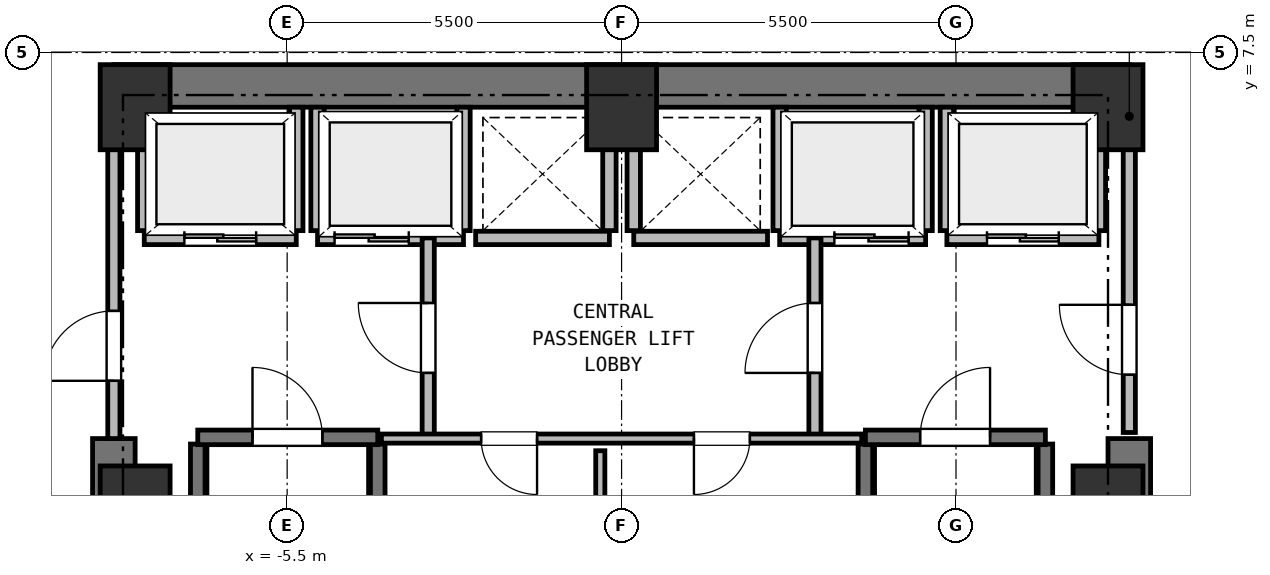
"""IFC4 building model, lengths in metres.
Left out: names, types, materials, properties, quantities, classifications, styles, units other than length and angle.
Written with IfcOpenShell. Run it as: python <this file> out.ifc"""

import sys

from ifc_helpers import new_model, si_unit, direction, frame, frame_2d, origin, origin_2d, place, context, subcontext, project, spatial, rectangle, extrude, element, fill, save


model = new_model("IFC4")
c1 = context("Model", 3, precision=1e-05, world=origin(), true_north=direction((0.0, 1.0)))
c2 = subcontext(c1, "Body", "Model", "MODEL_VIEW")
j1 = project(units=[si_unit("LENGTHUNIT", "METRE"), si_unit("PLANEANGLEUNIT", "RADIAN")], contexts=[c1])
p1 = place(None, origin())
s1 = spatial("IfcSite", under=j1, at=p1, CompositionType="ELEMENT")
p2 = place(p1, origin())
s2 = spatial("IfcBuilding", under=s1, at=p2, CompositionType="ELEMENT")
p3 = place(p2, frame((0.0, 0.0, 21.5)))
s3 = spatial("IfcBuildingStorey", under=s2, at=p3, CompositionType="ELEMENT", Elevation=21.5)
for number, where, z_axis, x_axis in (
    (1, (8.0, 0.0, 0.0), (0.0, 0.0, 1.0), (1.0, 0.0, 0.0)),
    (2, (8.0, 6.6, 0.0), (0.0, 0.0, 1.0), (1.0, 0.0, 0.0)),
    (3, (0.0, 6.6, 0.0), (0.0, 0.0, 1.0), (1.0, 0.0, 0.0)),
    (4, (-8.0, 6.6, 0.0), (0.0, 0.0, 1.0), (1.0, 0.0, 0.0)),
    (5, (-8.0, 0.0, 0.0), (0.0, 0.0, 1.0), (1.0, 0.0, 0.0)),
):
    element("IfcColumn", number, at=place(p3, frame(where, z_axis=z_axis, x_axis=x_axis)), inside=s3, PredefinedType="COLUMN", context=c2, shape_type="SweptSolid", body=[
        extrude(rectangle(XDim=1.15, YDim=1.4, at=origin_2d()), origin(), (0.0, 0.0, 1.0), 4.5),
    ])
p4 = place(p3, frame((-8.35, 6.95, 0.0), z_axis=(0.0, 0.0, 1.0), x_axis=(1.0, 0.0, 0.0)))
e6 = element("IfcWall", 6, at=p4, inside=s3, PredefinedType="SHEAR", context=c2, shape_type="SweptSolid", body=[
    extrude(rectangle(XDim=16.7, YDim=0.7, at=frame_2d((8.35, 0.0))), origin(), (0.0, 0.0, 1.0), 4.22),
])
for number, where, z_axis, x_axis in (
    (7, (-8.35, -6.95, 0.0), (0.0, 0.0, 1.0), (0.0, 1.0, 0.0)),
    (8, (8.35, -6.95, 0.0), (0.0, 0.0, 1.0), (0.0, 1.0, 0.0)),
):
    element("IfcWall", number, at=place(p3, frame(where, z_axis=z_axis, x_axis=x_axis)), inside=s3, PredefinedType="SHEAR", context=c2, shape_type="SweptSolid", body=[
        extrude(rectangle(XDim=8.1, YDim=0.7, at=frame_2d((4.05, 0.0))), origin(), (0.0, 0.0, 1.0), 4.22),
    ])
for number, where, z_axis, x_axis in (
    (9, (-6.97, -6.16, 0.0), (0.0, 0.0, 1.0), (0.0, 1.0, 0.0)),
    (10, (-4.01, -6.16, 0.0), (0.0, 0.0, 1.0), (0.0, 1.0, 0.0)),
):
    element("IfcWall", number, at=place(p3, frame(where, z_axis=z_axis, x_axis=x_axis)), inside=s3, PredefinedType="SHEAR", context=c2, shape_type="SweptSolid", body=[
        extrude(rectangle(XDim=7.22, YDim=0.24, at=frame_2d((3.61, 0.0))), origin(), (0.0, 0.0, 1.0), 4.22),
    ])
p5 = place(p3, frame((-6.97, 1.17, 0.0), z_axis=(0.0, 0.0, 1.0), x_axis=(1.0, 0.0, 0.0)))
e11 = element("IfcWall", 11, at=p5, inside=s3, PredefinedType="SHEAR", context=c2, shape_type="SweptSolid", body=[
    extrude(rectangle(XDim=2.96, YDim=0.24, at=frame_2d((1.48, 0.0))), origin(), (0.0, 0.0, 1.0), 4.22),
])
p6 = place(p5, frame((0.9, 0.0, 0.0)))
e12 = element("IfcOpeningElement", 12, at=p6, cuts=e11, PredefinedType="OPENING", context=c2, shape_type="SweptSolid", body=[
    extrude(rectangle(XDim=1.15, YDim=2.15, at=frame_2d((0.575, 1.075))), frame((0.0, 0.13, 0.0), z_axis=(0.0, -1.0, 0.0), x_axis=(1.0, 0.0, 0.0)), (0.0, 0.0, 1.0), 0.26),
])
for number, where, z_axis, x_axis in (
    (13, (4.01, -6.16, 0.0), (0.0, 0.0, 1.0), (0.0, 1.0, 0.0)),
    (14, (6.97, -6.16, 0.0), (0.0, 0.0, 1.0), (0.0, 1.0, 0.0)),
):
    element("IfcWall", number, at=place(p3, frame(where, z_axis=z_axis, x_axis=x_axis)), inside=s3, PredefinedType="SHEAR", context=c2, shape_type="SweptSolid", body=[
        extrude(rectangle(XDim=7.22, YDim=0.24, at=frame_2d((3.61, 0.0))), origin(), (0.0, 0.0, 1.0), 4.22),
    ])
p7 = place(p3, frame((4.01, 1.17, 0.0), z_axis=(0.0, 0.0, 1.0), x_axis=(1.0, 0.0, 0.0)))
e15 = element("IfcWall", 15, at=p7, inside=s3, PredefinedType="SHEAR", context=c2, shape_type="SweptSolid", body=[
    extrude(rectangle(XDim=2.96, YDim=0.24, at=frame_2d((1.48, 0.0))), origin(), (0.0, 0.0, 1.0), 4.22),
])
p8 = place(p7, frame((0.9, 0.0, 0.0)))
e16 = element("IfcOpeningElement", 16, at=p8, cuts=e15, PredefinedType="OPENING", context=c2, shape_type="SweptSolid", body=[
    extrude(rectangle(XDim=1.15, YDim=2.15, at=frame_2d((0.575, 1.075))), frame((0.0, 0.13, 0.0), z_axis=(0.0, -1.0, 0.0), x_axis=(1.0, 0.0, 0.0)), (0.0, 0.0, 1.0), 0.26),
])
p9 = place(p3, frame((-7.85, 4.45, 0.0), z_axis=(0.0, 0.0, 1.0), x_axis=(1.0, 0.0, 0.0)))
e17 = element("IfcWall", 17, at=p9, inside=s3, PredefinedType="PARTITIONING", context=c2, shape_type="SweptSolid", body=[
    extrude(rectangle(XDim=2.5, YDim=0.22, at=frame_2d((1.25, 0.0))), origin(), (0.0, 0.0, 1.0), 4.22),
])
p10 = place(p9, frame((0.66, 0.0, 0.0)))
e18 = element("IfcOpeningElement", 18, at=p10, cuts=e17, PredefinedType="OPENING", context=c2, shape_type="SweptSolid", body=[
    extrude(rectangle(XDim=1.18, YDim=2.15, at=frame_2d((0.59, 1.075))), frame((0.0, 0.12, 0.0), z_axis=(0.0, -1.0, 0.0), x_axis=(1.0, 0.0, 0.0)), (0.0, 0.0, 1.0), 0.24),
])
p11 = place(p3, frame((-7.85, 4.57, 0.0), z_axis=(0.0, 0.0, 1.0), x_axis=(0.0, 1.0, 0.0)))
e19 = element("IfcWall", 19, at=p11, inside=s3, PredefinedType="PARTITIONING", context=c2, shape_type="SweptSolid", body=[
    extrude(rectangle(XDim=2.03, YDim=0.22, at=frame_2d((1.015, 0.0))), origin(), (0.0, 0.0, 1.0), 3.8),
])
p12 = place(p3, frame((-5.35, 4.57, 0.0), z_axis=(0.0, 0.0, 1.0), x_axis=(0.0, 1.0, 0.0)))
e20 = element("IfcWall", 20, at=p12, inside=s3, PredefinedType="PARTITIONING", context=c2, shape_type="SweptSolid", body=[
    extrude(rectangle(XDim=2.03, YDim=0.22, at=frame_2d((1.015, 0.0))), origin(), (0.0, 0.0, 1.0), 4.22),
])
p13 = place(p3, frame((5.35, 4.45, 0.0), z_axis=(0.0, 0.0, 1.0), x_axis=(1.0, 0.0, 0.0)))
e21 = element("IfcWall", 21, at=p13, inside=s3, PredefinedType="PARTITIONING", context=c2, shape_type="SweptSolid", body=[
    extrude(rectangle(XDim=2.5, YDim=0.22, at=frame_2d((1.25, 0.0))), origin(), (0.0, 0.0, 1.0), 4.22),
])
p14 = place(p13, frame((0.66, 0.0, 0.0)))
e22 = element("IfcOpeningElement", 22, at=p14, cuts=e21, PredefinedType="OPENING", context=c2, shape_type="SweptSolid", body=[
    extrude(rectangle(XDim=1.18, YDim=2.15, at=frame_2d((0.59, 1.075))), frame((0.0, 0.12, 0.0), z_axis=(0.0, -1.0, 0.0), x_axis=(1.0, 0.0, 0.0)), (0.0, 0.0, 1.0), 0.24),
])
p15 = place(p3, frame((5.35, 4.57, 0.0), z_axis=(0.0, 0.0, 1.0), x_axis=(0.0, 1.0, 0.0)))
e23 = element("IfcWall", 23, at=p15, inside=s3, PredefinedType="PARTITIONING", context=c2, shape_type="SweptSolid", body=[
    extrude(rectangle(XDim=2.03, YDim=0.22, at=frame_2d((1.015, 0.0))), origin(), (0.0, 0.0, 1.0), 4.22),
])
p16 = place(p3, frame((7.85, 4.57, 0.0), z_axis=(0.0, 0.0, 1.0), x_axis=(0.0, 1.0, 0.0)))
e24 = element("IfcWall", 24, at=p16, inside=s3, PredefinedType="PARTITIONING", context=c2, shape_type="SweptSolid", body=[
    extrude(rectangle(XDim=2.03, YDim=0.22, at=frame_2d((1.015, 0.0))), origin(), (0.0, 0.0, 1.0), 3.8),
])
p17 = place(p3, frame((-5.0, 4.45, 0.0), z_axis=(0.0, 0.0, 1.0), x_axis=(1.0, 0.0, 0.0)))
e25 = element("IfcWall", 25, at=p17, inside=s3, PredefinedType="PARTITIONING", context=c2, shape_type="SweptSolid", body=[
    extrude(rectangle(XDim=2.4, YDim=0.22, at=frame_2d((1.2, 0.0))), origin(), (0.0, 0.0, 1.0), 4.22),
])
p18 = place(p17, frame((0.28, 0.0, 0.0)))
e26 = element("IfcOpeningElement", 26, at=p18, cuts=e25, PredefinedType="OPENING", context=c2, shape_type="SweptSolid", body=[
    extrude(rectangle(XDim=1.22, YDim=2.15, at=frame_2d((0.61, 1.075))), frame((0.0, 0.12, 0.0), z_axis=(0.0, -1.0, 0.0), x_axis=(1.0, 0.0, 0.0)), (0.0, 0.0, 1.0), 0.24),
])
for number, where, z_axis, x_axis in (
    (27, (-5.0, 4.57, 0.0), (0.0, 0.0, 1.0), (0.0, 1.0, 0.0)),
    (28, (-2.6, 4.57, 0.0), (0.0, 0.0, 1.0), (0.0, 1.0, 0.0)),
):
    element("IfcWall", number, at=place(p3, frame(where, z_axis=z_axis, x_axis=x_axis)), inside=s3, PredefinedType="PARTITIONING", context=c2, shape_type="SweptSolid", body=[
        extrude(rectangle(XDim=2.03, YDim=0.22, at=frame_2d((1.015, 0.0))), origin(), (0.0, 0.0, 1.0), 4.22),
    ])
p19 = place(p3, frame((2.6, 4.45, 0.0), z_axis=(0.0, 0.0, 1.0), x_axis=(1.0, 0.0, 0.0)))
e29 = element("IfcWall", 29, at=p19, inside=s3, PredefinedType="PARTITIONING", context=c2, shape_type="SweptSolid", body=[
    extrude(rectangle(XDim=2.4, YDim=0.22, at=frame_2d((1.2, 0.0))), origin(), (0.0, 0.0, 1.0), 4.22),
])
p20 = place(p19, frame((0.9, 0.0, 0.0)))
e30 = element("IfcOpeningElement", 30, at=p20, cuts=e29, PredefinedType="OPENING", context=c2, shape_type="SweptSolid", body=[
    extrude(rectangle(XDim=1.22, YDim=2.15, at=frame_2d((0.61, 1.075))), frame((0.0, 0.12, 0.0), z_axis=(0.0, -1.0, 0.0), x_axis=(1.0, 0.0, 0.0)), (0.0, 0.0, 1.0), 0.24),
])
for number, where, z_axis, x_axis in (
    (31, (2.6, 4.57, 0.0), (0.0, 0.0, 1.0), (0.0, 1.0, 0.0)),
    (32, (5.0, 4.57, 0.0), (0.0, 0.0, 1.0), (0.0, 1.0, 0.0)),
):
    element("IfcWall", number, at=place(p3, frame(where, z_axis=z_axis, x_axis=x_axis)), inside=s3, PredefinedType="PARTITIONING", context=c2, shape_type="SweptSolid", body=[
        extrude(rectangle(XDim=2.03, YDim=0.22, at=frame_2d((1.015, 0.0))), origin(), (0.0, 0.0, 1.0), 4.22),
    ])
p21 = place(p3, frame((-2.4, 4.45, 0.0), z_axis=(0.0, 0.0, 1.0), x_axis=(1.0, 0.0, 0.0)))
e33 = element("IfcWall", 33, at=p21, inside=s3, PredefinedType="PARTITIONING", context=c2, shape_type="SweptSolid", body=[
    extrude(rectangle(XDim=2.2, YDim=0.22, at=frame_2d((1.1, 0.0))), origin(), (0.0, 0.0, 1.0), 4.22),
])
p22 = place(p3, frame((-0.2, 4.57, 0.0), z_axis=(0.0, 0.0, 1.0), x_axis=(0.0, 1.0, 0.0)))
e34 = element("IfcWall", 34, at=p22, inside=s3, PredefinedType="PARTITIONING", context=c2, shape_type="SweptSolid", body=[
    extrude(rectangle(XDim=2.03, YDim=0.22, at=frame_2d((1.015, 0.0))), origin(), (0.0, 0.0, 1.0), 4.22),
])
p23 = place(p3, frame((0.2, 4.45, 0.0), z_axis=(0.0, 0.0, 1.0), x_axis=(1.0, 0.0, 0.0)))
e35 = element("IfcWall", 35, at=p23, inside=s3, PredefinedType="PARTITIONING", context=c2, shape_type="SweptSolid", body=[
    extrude(rectangle(XDim=2.2, YDim=0.22, at=frame_2d((1.1, 0.0))), origin(), (0.0, 0.0, 1.0), 4.22),
])
p24 = place(p3, frame((0.2, 4.57, 0.0), z_axis=(0.0, 0.0, 1.0), x_axis=(0.0, 1.0, 0.0)))
e36 = element("IfcWall", 36, at=p24, inside=s3, PredefinedType="PARTITIONING", context=c2, shape_type="SweptSolid", body=[
    extrude(rectangle(XDim=2.03, YDim=0.22, at=frame_2d((1.015, 0.0))), origin(), (0.0, 0.0, 1.0), 4.22),
])
p25 = place(p3, frame((-3.18, 1.15, 0.0), z_axis=(0.0, 0.0, 1.0), x_axis=(0.0, 1.0, 0.0)))
e37 = element("IfcWall", 37, at=p25, inside=s3, PredefinedType="PARTITIONING", context=c2, shape_type="SweptSolid", body=[
    extrude(rectangle(XDim=3.3, YDim=0.2, at=frame_2d((1.65, 0.0))), origin(), (0.0, 0.0, 1.0), 4.22),
])
p26 = place(p25, frame((1.08, 0.0, 0.0)))
e38 = element("IfcOpeningElement", 38, at=p26, cuts=e37, PredefinedType="OPENING", context=c2, shape_type="SweptSolid", body=[
    extrude(rectangle(XDim=1.15, YDim=2.15, at=frame_2d((0.575, 1.075))), frame((0.0, 0.11, 0.0), z_axis=(0.0, -1.0, 0.0), x_axis=(1.0, 0.0, 0.0)), (0.0, 0.0, 1.0), 0.22),
])
p27 = place(p3, frame((3.18, 1.15, 0.0), z_axis=(0.0, 0.0, 1.0), x_axis=(0.0, 1.0, 0.0)))
e39 = element("IfcWall", 39, at=p27, inside=s3, PredefinedType="PARTITIONING", context=c2, shape_type="SweptSolid", body=[
    extrude(rectangle(XDim=3.3, YDim=0.2, at=frame_2d((1.65, 0.0))), origin(), (0.0, 0.0, 1.0), 4.22),
])
p28 = place(p27, frame((1.08, 0.0, 0.0)))
e40 = element("IfcOpeningElement", 40, at=p28, cuts=e39, PredefinedType="OPENING", context=c2, shape_type="SweptSolid", body=[
    extrude(rectangle(XDim=1.15, YDim=2.15, at=frame_2d((0.575, 1.075))), frame((0.0, 0.11, 0.0), z_axis=(0.0, -1.0, 0.0), x_axis=(1.0, 0.0, 0.0)), (0.0, 0.0, 1.0), 0.22),
])
p29 = place(p3, frame((-8.35, 1.15, 0.0), z_axis=(0.0, 0.0, 1.0), x_axis=(0.0, 1.0, 0.0)))
e41 = element("IfcWall", 41, at=p29, inside=s3, PredefinedType="PARTITIONING", context=c2, shape_type="SweptSolid", body=[
    extrude(rectangle(XDim=5.4, YDim=0.2, at=frame_2d((2.7, 0.0))), origin(), (0.0, 0.0, 1.0), 4.22),
])
p30 = place(p29, frame((0.95, 0.0, 0.0)))
e42 = element("IfcOpeningElement", 42, at=p30, cuts=e41, PredefinedType="OPENING", context=c2, shape_type="SweptSolid", body=[
    extrude(rectangle(XDim=1.15, YDim=2.15, at=frame_2d((0.575, 1.075))), frame((0.0, 0.11, 0.0), z_axis=(0.0, -1.0, 0.0), x_axis=(1.0, 0.0, 0.0)), (0.0, 0.0, 1.0), 0.22),
])
p31 = place(p3, frame((8.35, 1.25, 0.0), z_axis=(0.0, 0.0, 1.0), x_axis=(0.0, 1.0, 0.0)))
e43 = element("IfcWall", 43, at=p31, inside=s3, PredefinedType="PARTITIONING", context=c2, shape_type="SweptSolid", body=[
    extrude(rectangle(XDim=5.3, YDim=0.2, at=frame_2d((2.65, 0.0))), origin(), (0.0, 0.0, 1.0), 4.22),
])
p32 = place(p31, frame((0.95, 0.0, 0.0)))
e44 = element("IfcOpeningElement", 44, at=p32, cuts=e43, PredefinedType="OPENING", context=c2, shape_type="SweptSolid", body=[
    extrude(rectangle(XDim=1.15, YDim=2.15, at=frame_2d((0.575, 1.075))), frame((0.0, 0.11, 0.0), z_axis=(0.0, -1.0, 0.0), x_axis=(1.0, 0.0, 0.0)), (0.0, 0.0, 1.0), 0.22),
])
p33 = place(p3, frame((3.95, 1.15, 0.0), z_axis=(0.0, 0.0, 1.0), x_axis=(-1.0, 0.0, 0.0)))
e45 = element("IfcWall", 45, at=p33, inside=s3, PredefinedType="PARTITIONING", context=c2, shape_type="SweptSolid", body=[
    extrude(rectangle(XDim=7.9, YDim=0.15, at=frame_2d((3.95, 0.0))), origin(), (0.0, 0.0, 1.0), 4.22),
])
p34 = place(p33, frame((5.34, 0.0, 0.0)))
e46 = element("IfcOpeningElement", 46, at=p34, cuts=e45, PredefinedType="OPENING", context=c2, shape_type="SweptSolid", body=[
    extrude(rectangle(XDim=0.92, YDim=2.05, at=frame_2d((0.46, 1.025))), frame((0.0, 0.085, 0.0), z_axis=(0.0, -1.0, 0.0), x_axis=(1.0, 0.0, 0.0)), (0.0, 0.0, 1.0), 0.17),
])
p35 = place(p33, frame((1.84, 0.0, 0.0)))
e47 = element("IfcOpeningElement", 47, at=p35, cuts=e45, PredefinedType="OPENING", context=c2, shape_type="SweptSolid", body=[
    extrude(rectangle(XDim=0.92, YDim=2.05, at=frame_2d((0.46, 1.025))), frame((0.0, 0.085, 0.0), z_axis=(0.0, -1.0, 0.0), x_axis=(1.0, 0.0, 0.0)), (0.0, 0.0, 1.0), 0.17),
])
p36 = place(p3, frame((-0.35, -1.73, 0.0), z_axis=(0.0, 0.0, 1.0), x_axis=(0.0, 1.0, 0.0)))
e48 = element("IfcWall", 48, at=p36, inside=s3, PredefinedType="PARTITIONING", context=c2, shape_type="SweptSolid", body=[
    extrude(rectangle(XDim=2.68, YDim=0.15, at=frame_2d((1.34, 0.0))), origin(), (0.0, 0.0, 1.0), 4.22),
])
p37 = place(p6, origin())
e49 = element("IfcDoor", 49, at=p37, inside=s3, OperationType="SINGLE_SWING_LEFT", PredefinedType="DOOR", context=c2, shape_type="SweptSolid", body=[
    extrude(rectangle(XDim=1.15, YDim=2.15, at=frame_2d((0.575, 1.075))), frame((0.0, 0.025, 0.0), z_axis=(0.0, -1.0, 0.0), x_axis=(1.0, 0.0, 0.0)), (0.0, 0.0, 1.0), 0.05),
])
fill(e12, e49)
p38 = place(p8, origin())
e50 = element("IfcDoor", 50, at=p38, inside=s3, OperationType="SINGLE_SWING_RIGHT", PredefinedType="DOOR", context=c2, shape_type="SweptSolid", body=[
    extrude(rectangle(XDim=1.15, YDim=2.15, at=frame_2d((0.575, 1.075))), frame((0.0, 0.025, 0.0), z_axis=(0.0, -1.0, 0.0), x_axis=(1.0, 0.0, 0.0)), (0.0, 0.0, 1.0), 0.05),
])
fill(e16, e50)
p39 = place(p10, origin())
e51 = element("IfcDoor", 51, at=p39, inside=s3, OperationType="DOUBLE_DOOR_SLIDING", PredefinedType="DOOR", context=c2, shape_type="SweptSolid", body=[
    extrude(rectangle(XDim=1.18, YDim=2.15, at=frame_2d((0.59, 1.075))), frame((0.0, 0.025, 0.0), z_axis=(0.0, -1.0, 0.0), x_axis=(1.0, 0.0, 0.0)), (0.0, 0.0, 1.0), 0.05),
])
fill(e18, e51)
p40 = place(p14, origin())
e52 = element("IfcDoor", 52, at=p40, inside=s3, OperationType="DOUBLE_DOOR_SLIDING", PredefinedType="DOOR", context=c2, shape_type="SweptSolid", body=[
    extrude(rectangle(XDim=1.18, YDim=2.15, at=frame_2d((0.59, 1.075))), frame((0.0, 0.025, 0.0), z_axis=(0.0, -1.0, 0.0), x_axis=(1.0, 0.0, 0.0)), (0.0, 0.0, 1.0), 0.05),
])
fill(e22, e52)
p41 = place(p18, origin())
e53 = element("IfcDoor", 53, at=p41, inside=s3, OperationType="DOUBLE_DOOR_SLIDING", PredefinedType="DOOR", context=c2, shape_type="SweptSolid", body=[
    extrude(rectangle(XDim=1.22, YDim=2.15, at=frame_2d((0.61, 1.075))), frame((0.0, 0.025, 0.0), z_axis=(0.0, -1.0, 0.0), x_axis=(1.0, 0.0, 0.0)), (0.0, 0.0, 1.0), 0.05),
])
fill(e26, e53)
p42 = place(p20, origin())
e54 = element("IfcDoor", 54, at=p42, inside=s3, OperationType="DOUBLE_DOOR_SLIDING", PredefinedType="DOOR", context=c2, shape_type="SweptSolid", body=[
    extrude(rectangle(XDim=1.22, YDim=2.15, at=frame_2d((0.61, 1.075))), frame((0.0, 0.025, 0.0), z_axis=(0.0, -1.0, 0.0), x_axis=(1.0, 0.0, 0.0)), (0.0, 0.0, 1.0), 0.05),
])
fill(e30, e54)
p43 = place(p26, origin())
e55 = element("IfcDoor", 55, at=p43, inside=s3, OperationType="SINGLE_SWING_RIGHT", PredefinedType="DOOR", context=c2, shape_type="SweptSolid", body=[
    extrude(rectangle(XDim=1.15, YDim=2.15, at=frame_2d((0.575, 1.075))), frame((0.0, 0.025, 0.0), z_axis=(0.0, -1.0, 0.0), x_axis=(1.0, 0.0, 0.0)), (0.0, 0.0, 1.0), 0.05),
])
fill(e38, e55)
p44 = place(p28, origin())
e56 = element("IfcDoor", 56, at=p44, inside=s3, OperationType="SINGLE_SWING_LEFT", PredefinedType="DOOR", context=c2, shape_type="SweptSolid", body=[
    extrude(rectangle(XDim=1.15, YDim=2.15, at=frame_2d((0.575, 1.075))), frame((0.0, 0.025, 0.0), z_axis=(0.0, -1.0, 0.0), x_axis=(1.0, 0.0, 0.0)), (0.0, 0.0, 1.0), 0.05),
])
fill(e40, e56)
p45 = place(p30, origin())
e57 = element("IfcDoor", 57, at=p45, inside=s3, OperationType="SINGLE_SWING_LEFT", PredefinedType="DOOR", context=c2, shape_type="SweptSolid", body=[
    extrude(rectangle(XDim=1.15, YDim=2.15, at=frame_2d((0.575, 1.075))), frame((0.0, 0.025, 0.0), z_axis=(0.0, -1.0, 0.0), x_axis=(1.0, 0.0, 0.0)), (0.0, 0.0, 1.0), 0.05),
])
fill(e42, e57)
p46 = place(p32, origin())
e58 = element("IfcDoor", 58, at=p46, inside=s3, OperationType="SINGLE_SWING_RIGHT", PredefinedType="DOOR", context=c2, shape_type="SweptSolid", body=[
    extrude(rectangle(XDim=1.15, YDim=2.15, at=frame_2d((0.575, 1.075))), frame((0.0, 0.025, 0.0), z_axis=(0.0, -1.0, 0.0), x_axis=(1.0, 0.0, 0.0)), (0.0, 0.0, 1.0), 0.05),
])
fill(e44, e58)
p47 = place(p34, origin())
e59 = element("IfcDoor", 59, at=p47, inside=s3, OperationType="SINGLE_SWING_LEFT", PredefinedType="DOOR", context=c2, shape_type="SweptSolid", body=[
    extrude(rectangle(XDim=0.92, YDim=2.05, at=frame_2d((0.46, 1.025))), frame((0.0, 0.025, 0.0), z_axis=(0.0, -1.0, 0.0), x_axis=(1.0, 0.0, 0.0)), (0.0, 0.0, 1.0), 0.05),
])
fill(e46, e59)
p48 = place(p35, origin())
e60 = element("IfcDoor", 60, at=p48, inside=s3, OperationType="SINGLE_SWING_RIGHT", PredefinedType="DOOR", context=c2, shape_type="SweptSolid", body=[
    extrude(rectangle(XDim=0.92, YDim=2.05, at=frame_2d((0.46, 1.025))), frame((0.0, 0.025, 0.0), z_axis=(0.0, -1.0, 0.0), x_axis=(1.0, 0.0, 0.0)), (0.0, 0.0, 1.0), 0.05),
])
fill(e47, e60)
save(model, sys.argv[1])
